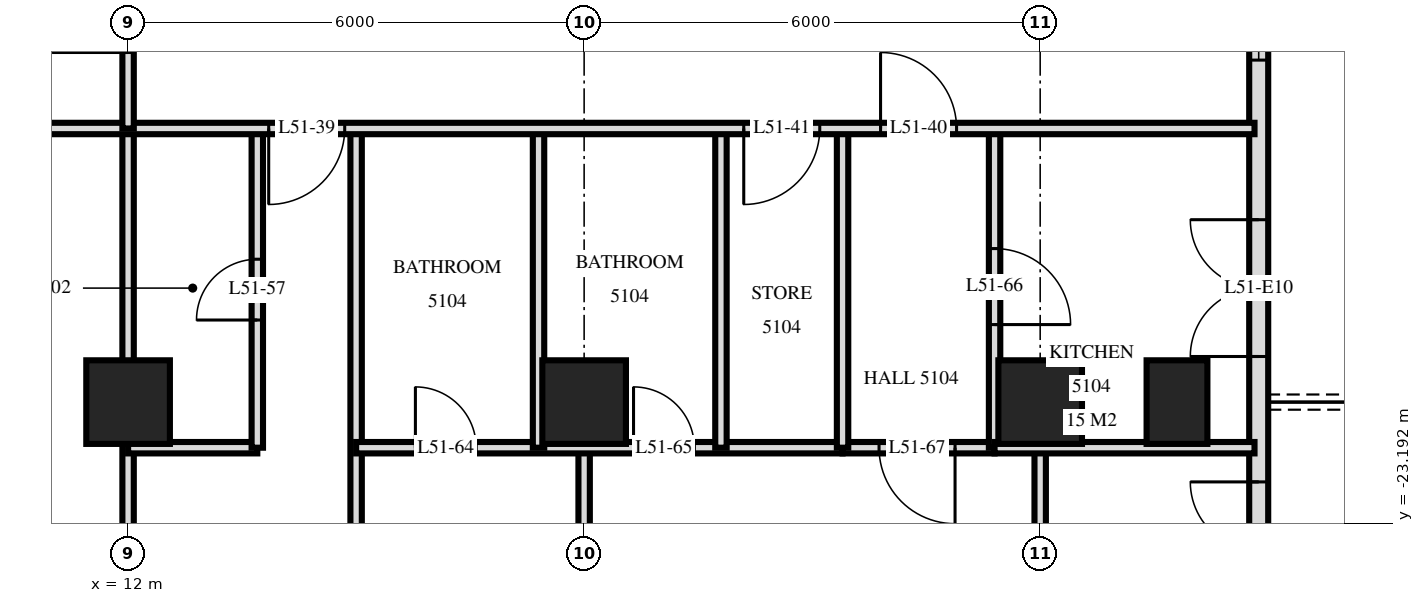
"""IFC4 building model, lengths in metres.
Left out: names, types, materials, properties, quantities, classifications, styles, units other than length and angle.
Written with IfcOpenShell. Run it as: python <this file> out.ifc"""

import sys

from ifc_helpers import new_model, si_unit, direction, frame, frame_2d, origin, origin_2d, place, context, subcontext, project, spatial, rectangle, extrude, element, fill, save


model = new_model("IFC4")
c1 = context("Model", 3, precision=1e-05, world=origin(), true_north=direction((0.0, 1.0)))
c2 = subcontext(c1, "Body", "Model", "MODEL_VIEW")
j1 = project(units=[si_unit("LENGTHUNIT", "METRE"), si_unit("PLANEANGLEUNIT", "RADIAN")], contexts=[c1])
p1 = place(None, origin())
s1 = spatial("IfcSite", under=j1, at=p1, CompositionType="ELEMENT")
p2 = place(p1, origin())
s2 = spatial("IfcBuilding", under=s1, at=p2, CompositionType="ELEMENT")
p3 = place(p2, frame((0.0, 0.0, 197.6)))
s3 = spatial("IfcBuildingStorey", under=s2, at=p3, CompositionType="ELEMENT", Elevation=197.6)
for number, where, z_axis, x_axis in (
    (1, (12.0, -21.6, 0.0), (0.0, 0.0, 1.0), (1.0, 0.0, 0.0)),
    (2, (18.0, -21.6, 0.0), (0.0, 0.0, 1.0), (1.0, 0.0, 0.0)),
    (3, (24.0, -21.6, 0.0), (0.0, 0.0, 1.0), (1.0, 0.0, 0.0)),
):
    element("IfcColumn", number, at=place(p3, frame(where, z_axis=z_axis, x_axis=x_axis)), inside=s3, PredefinedType="COLUMN", context=c2, shape_type="SweptSolid", body=[
        extrude(rectangle(XDim=1.1, YDim=1.1, at=origin_2d()), origin(), (0.0, 0.0, 1.0), 3.5),
    ])
p4 = place(p3, frame((25.8, -21.6, 0.0), z_axis=(0.0, 0.0, 1.0), x_axis=(0.0, 1.0, 0.0)))
e4 = element("IfcColumn", 4, at=p4, inside=s3, PredefinedType="COLUMN", context=c2, shape_type="SweptSolid", body=[
    extrude(rectangle(XDim=1.1, YDim=0.8, at=origin_2d()), origin(), (0.0, 0.0, 1.0), 3.5),
])
p5 = place(p3, frame((26.875, -24.875, 0.0), z_axis=(0.0, 0.0, 1.0), x_axis=(0.0, 1.0, 0.0)))
e5 = element("IfcWall", 5, at=p5, inside=s3, PredefinedType="SOLIDWALL", context=c2, shape_type="SweptSolid", body=[
    extrude(rectangle(XDim=21.551, YDim=0.25, at=frame_2d((10.775, 0.0))), origin(), (0.0, 0.0, 1.0), 3.22),
])
p6 = place(p5, frame((0.425, 0.0, 0.0)))
e6 = element("IfcOpeningElement", 6, at=p6, cuts=e5, PredefinedType="OPENING", context=c2, shape_type="SweptSolid", body=[
    extrude(rectangle(XDim=1.8, YDim=2.4, at=frame_2d((0.9, 1.2))), frame((0.0, 0.135, 0.0), z_axis=(0.0, -1.0, 0.0), x_axis=(1.0, 0.0, 0.0)), (0.0, 0.0, 1.0), 0.27),
])
p7 = place(p5, frame((3.875, 0.0, 0.0)))
e7 = element("IfcOpeningElement", 7, at=p7, cuts=e5, PredefinedType="OPENING", context=c2, shape_type="SweptSolid", body=[
    extrude(rectangle(XDim=1.8, YDim=2.4, at=frame_2d((0.9, 1.2))), frame((0.0, 0.135, 0.0), z_axis=(0.0, -1.0, 0.0), x_axis=(1.0, 0.0, 0.0)), (0.0, 0.0, 1.0), 0.27),
])
p8 = place(p5, frame((7.775, 0.0, 0.9)))
e8 = element("IfcOpeningElement", 8, at=p8, cuts=e5, PredefinedType="OPENING", context=c2, shape_type="SweptSolid", body=[
    extrude(rectangle(XDim=1.2, YDim=1.5, at=frame_2d((0.6, 0.75))), frame((0.0, 0.135, 0.0), z_axis=(0.0, -1.0, 0.0), x_axis=(1.0, 0.0, 0.0)), (0.0, 0.0, 1.0), 0.27),
])
p9 = place(p5, frame((11.975, 0.0, 0.0)))
e9 = element("IfcOpeningElement", 9, at=p9, cuts=e5, PredefinedType="OPENING", context=c2, shape_type="SweptSolid", body=[
    extrude(rectangle(XDim=1.8, YDim=2.4, at=frame_2d((0.9, 1.2))), frame((0.0, 0.135, 0.0), z_axis=(0.0, -1.0, 0.0), x_axis=(1.0, 0.0, 0.0)), (0.0, 0.0, 1.0), 0.27),
])
p10 = place(p3, frame((24.0, -28.918, 0.0), z_axis=(0.0, 0.0, 1.0), x_axis=(0.0, 1.0, 0.0)))
e10 = element("IfcWall", 10, at=p10, inside=s3, PredefinedType="PARTITIONING", context=c2, shape_type="SweptSolid", body=[
    extrude(rectangle(XDim=6.718, YDim=0.15, at=frame_2d((3.359, 0.0))), origin(), (0.0, 0.0, 1.0), 3.22),
])
p11 = place(p10, frame((2.948, 0.0, 0.0)))
e11 = element("IfcOpeningElement", 11, at=p11, cuts=e10, PredefinedType="OPENING", context=c2, shape_type="SweptSolid", body=[
    extrude(rectangle(XDim=0.9, YDim=2.1, at=frame_2d((0.45, 1.05))), frame((0.0, 0.085, 0.0), z_axis=(0.0, -1.0, 0.0), x_axis=(1.0, 0.0, 0.0)), (0.0, 0.0, 1.0), 0.17),
])
p12 = place(p3, frame((23.4, -22.2, 0.0), z_axis=(0.0, 0.0, 1.0), x_axis=(0.0, 1.0, 0.0)))
e12 = element("IfcWall", 12, at=p12, inside=s3, PredefinedType="PARTITIONING", context=c2, shape_type="SweptSolid", body=[
    extrude(rectangle(XDim=4.2, YDim=0.15, at=frame_2d((2.1, 0.0))), origin(), (0.0, 0.0, 1.0), 3.22),
])
p13 = place(p12, frame((1.62, 0.0, 0.0)))
e13 = element("IfcOpeningElement", 13, at=p13, cuts=e12, PredefinedType="OPENING", context=c2, shape_type="SweptSolid", body=[
    extrude(rectangle(XDim=1.0, YDim=2.1, at=frame_2d((0.5, 1.05))), frame((0.0, 0.085, 0.0), z_axis=(0.0, -1.0, 0.0), x_axis=(1.0, 0.0, 0.0)), (0.0, 0.0, 1.0), 0.17),
])
for number, where, z_axis, x_axis in (
    (14, (21.4, -22.2, 0.0), (0.0, 0.0, 1.0), (0.0, 1.0, 0.0)),
    (15, (19.8, -22.2, 0.0), (0.0, 0.0, 1.0), (0.0, 1.0, 0.0)),
):
    element("IfcWall", number, at=place(p3, frame(where, z_axis=z_axis, x_axis=x_axis)), inside=s3, PredefinedType="PARTITIONING", context=c2, shape_type="SweptSolid", body=[
        extrude(rectangle(XDim=4.2, YDim=0.15, at=frame_2d((2.1, 0.0))), origin(), (0.0, 0.0, 1.0), 3.22),
    ])
p14 = place(p3, frame((18.0, -29.22, 0.0), z_axis=(0.0, 0.0, 1.0), x_axis=(0.0, 1.0, 0.0)))
e16 = element("IfcWall", 16, at=p14, inside=s3, PredefinedType="PARTITIONING", context=c2, shape_type="SweptSolid", body=[
    extrude(rectangle(XDim=7.02, YDim=0.15, at=frame_2d((3.51, 0.0))), origin(), (0.0, 0.0, 1.0), 3.22),
])
p15 = place(p14, frame((2.99, 0.0, 0.0)))
e17 = element("IfcOpeningElement", 17, at=p15, cuts=e16, PredefinedType="OPENING", context=c2, shape_type="SweptSolid", body=[
    extrude(rectangle(XDim=0.9, YDim=2.1, at=frame_2d((0.45, 1.05))), frame((0.0, 0.085, 0.0), z_axis=(0.0, -1.0, 0.0), x_axis=(1.0, 0.0, 0.0)), (0.0, 0.0, 1.0), 0.17),
])
p16 = place(p3, frame((17.4, -22.2, 0.0), z_axis=(0.0, 0.0, 1.0), x_axis=(0.0, 1.0, 0.0)))
e18 = element("IfcWall", 18, at=p16, inside=s3, PredefinedType="PARTITIONING", context=c2, shape_type="SweptSolid", body=[
    extrude(rectangle(XDim=4.2, YDim=0.15, at=frame_2d((2.1, 0.0))), origin(), (0.0, 0.0, 1.0), 3.22),
])
p17 = place(p3, frame((15.0, -29.22, 0.0), z_axis=(0.0, 0.0, 1.0), x_axis=(0.0, 1.0, 0.0)))
e19 = element("IfcWall", 19, at=p17, inside=s3, PredefinedType="PARTITIONING", context=c2, shape_type="SweptSolid", body=[
    extrude(rectangle(XDim=11.22, YDim=0.15, at=frame_2d((5.61, 0.0))), origin(), (0.0, 0.0, 1.0), 3.22),
])
p18 = place(p3, frame((13.7, -22.2, 0.0), z_axis=(0.0, 0.0, 1.0), x_axis=(0.0, 1.0, 0.0)))
e20 = element("IfcWall", 20, at=p18, inside=s3, PredefinedType="PARTITIONING", context=c2, shape_type="SweptSolid", body=[
    extrude(rectangle(XDim=4.2, YDim=0.15, at=frame_2d((2.1, 0.0))), origin(), (0.0, 0.0, 1.0), 3.22),
])
p19 = place(p18, frame((1.68, 0.0, 0.0)))
e21 = element("IfcOpeningElement", 21, at=p19, cuts=e20, PredefinedType="OPENING", context=c2, shape_type="SweptSolid", body=[
    extrude(rectangle(XDim=0.8, YDim=2.1, at=frame_2d((0.4, 1.05))), frame((0.0, 0.085, 0.0), z_axis=(0.0, -1.0, 0.0), x_axis=(1.0, 0.0, 0.0)), (0.0, 0.0, 1.0), 0.17),
])
p20 = place(p3, frame((12.0, -18.0, 0.0), z_axis=(0.0, 0.0, 1.0), x_axis=(0.0, 1.0, 0.0)))
e22 = element("IfcWall", 22, at=p20, inside=s3, PredefinedType="PARTITIONING", context=c2, shape_type="SweptSolid", body=[
    extrude(rectangle(XDim=2.95, YDim=0.15, at=frame_2d((1.475, 0.0))), origin(), (0.0, 0.0, 1.0), 3.22),
])
p21 = place(p20, frame((1.0, 0.0, 0.0)))
e23 = element("IfcOpeningElement", 23, at=p21, cuts=e22, PredefinedType="OPENING", context=c2, shape_type="SweptSolid", body=[
    extrude(rectangle(XDim=1.0, YDim=2.1, at=frame_2d((0.5, 1.05))), frame((0.0, 0.085, 0.0), z_axis=(0.0, -1.0, 0.0), x_axis=(1.0, 0.0, 0.0)), (0.0, 0.0, 1.0), 0.17),
])
p22 = place(p3, frame((12.0, -29.22, 0.0), z_axis=(0.0, 0.0, 1.0), x_axis=(0.0, 1.0, 0.0)))
e24 = element("IfcWall", 24, at=p22, inside=s3, PredefinedType="PARTITIONING", context=c2, shape_type="SweptSolid", body=[
    extrude(rectangle(XDim=11.22, YDim=0.15, at=frame_2d((5.61, 0.0))), origin(), (0.0, 0.0, 1.0), 3.22),
])
p23 = place(p3, frame((21.4, -22.2, 0.0), z_axis=(0.0, 0.0, 1.0), x_axis=(1.0, 0.0, 0.0)))
e25 = element("IfcWall", 25, at=p23, inside=s3, PredefinedType="PARTITIONING", context=c2, shape_type="SweptSolid", body=[
    extrude(rectangle(XDim=2.0, YDim=0.15, at=frame_2d((1.0, 0.0))), origin(), (0.0, 0.0, 1.0), 3.22),
])
p24 = place(p23, frame((0.48, 0.0, 0.0)))
e26 = element("IfcOpeningElement", 26, at=p24, cuts=e25, PredefinedType="OPENING", context=c2, shape_type="SweptSolid", body=[
    extrude(rectangle(XDim=1.0, YDim=2.1, at=frame_2d((0.5, 1.05))), frame((0.0, 0.085, 0.0), z_axis=(0.0, -1.0, 0.0), x_axis=(1.0, 0.0, 0.0)), (0.0, 0.0, 1.0), 0.17),
])
p25 = place(p3, frame((12.0, -22.2, 0.0), z_axis=(0.0, 0.0, 1.0), x_axis=(1.0, 0.0, 0.0)))
e27 = element("IfcWall", 27, at=p25, inside=s3, PredefinedType="PARTITIONING", context=c2, shape_type="SweptSolid", body=[
    extrude(rectangle(XDim=1.7, YDim=0.15, at=frame_2d((0.85, 0.0))), origin(), (0.0, 0.0, 1.0), 3.22),
])
p26 = place(p3, frame((15.0, -22.2, 0.0), z_axis=(0.0, 0.0, 1.0), x_axis=(1.0, 0.0, 0.0)))
e28 = element("IfcWall", 28, at=p26, inside=s3, PredefinedType="PARTITIONING", context=c2, shape_type="SweptSolid", body=[
    extrude(rectangle(XDim=6.4, YDim=0.15, at=frame_2d((3.2, 0.0))), origin(), (0.0, 0.0, 1.0), 3.22),
])
p27 = place(p26, frame((0.78, 0.0, 0.0)))
e29 = element("IfcOpeningElement", 29, at=p27, cuts=e28, PredefinedType="OPENING", context=c2, shape_type="SweptSolid", body=[
    extrude(rectangle(XDim=0.8, YDim=2.1, at=frame_2d((0.4, 1.05))), frame((0.0, 0.085, 0.0), z_axis=(0.0, -1.0, 0.0), x_axis=(1.0, 0.0, 0.0)), (0.0, 0.0, 1.0), 0.17),
])
p28 = place(p26, frame((3.65, 0.0, 0.0)))
e30 = element("IfcOpeningElement", 30, at=p28, cuts=e28, PredefinedType="OPENING", context=c2, shape_type="SweptSolid", body=[
    extrude(rectangle(XDim=0.8, YDim=2.1, at=frame_2d((0.4, 1.05))), frame((0.0, 0.085, 0.0), z_axis=(0.0, -1.0, 0.0), x_axis=(1.0, 0.0, 0.0)), (0.0, 0.0, 1.0), 0.17),
])
p29 = place(p3, frame((23.4, -22.2, 0.0), z_axis=(0.0, 0.0, 1.0), x_axis=(1.0, 0.0, 0.0)))
e31 = element("IfcWall", 31, at=p29, inside=s3, PredefinedType="PARTITIONING", context=c2, shape_type="SweptSolid", body=[
    extrude(rectangle(XDim=3.42, YDim=0.15, at=frame_2d((1.71, 0.0))), origin(), (0.0, 0.0, 1.0), 3.22),
])
p30 = place(p3, frame((-26.82, -18.0, 0.0), z_axis=(0.0, 0.0, 1.0), x_axis=(1.0, 0.0, 0.0)))
e32 = element("IfcWall", 32, at=p30, inside=s3, PredefinedType="PARTITIONING", context=c2, shape_type="SweptSolid", body=[
    extrude(rectangle(XDim=53.64, YDim=0.15, at=frame_2d((26.82, 0.0))), origin(), (0.0, 0.0, 1.0), 3.22),
])
p31 = place(p30, frame((11.97, 0.0, 0.0)))
e33 = element("IfcOpeningElement", 33, at=p31, cuts=e32, PredefinedType="OPENING", context=c2, shape_type="SweptSolid", body=[
    extrude(rectangle(XDim=1.0, YDim=2.1, at=frame_2d((0.5, 1.05))), frame((0.0, 0.085, 0.0), z_axis=(0.0, -1.0, 0.0), x_axis=(1.0, 0.0, 0.0)), (0.0, 0.0, 1.0), 0.17),
])
p32 = place(p30, frame((3.92, 0.0, 0.0)))
e34 = element("IfcOpeningElement", 34, at=p32, cuts=e32, PredefinedType="OPENING", context=c2, shape_type="SweptSolid", body=[
    extrude(rectangle(XDim=1.0, YDim=2.1, at=frame_2d((0.5, 1.05))), frame((0.0, 0.085, 0.0), z_axis=(0.0, -1.0, 0.0), x_axis=(1.0, 0.0, 0.0)), (0.0, 0.0, 1.0), 0.17),
])
p33 = place(p30, frame((5.72, 0.0, 0.0)))
e35 = element("IfcOpeningElement", 35, at=p33, cuts=e32, PredefinedType="OPENING", context=c2, shape_type="SweptSolid", body=[
    extrude(rectangle(XDim=1.0, YDim=2.1, at=frame_2d((0.5, 1.05))), frame((0.0, 0.085, 0.0), z_axis=(0.0, -1.0, 0.0), x_axis=(1.0, 0.0, 0.0)), (0.0, 0.0, 1.0), 0.17),
])
p34 = place(p30, frame((40.67, 0.0, 0.0)))
e36 = element("IfcOpeningElement", 36, at=p34, cuts=e32, PredefinedType="OPENING", context=c2, shape_type="SweptSolid", body=[
    extrude(rectangle(XDim=1.0, YDim=2.1, at=frame_2d((0.5, 1.05))), frame((0.0, 0.085, 0.0), z_axis=(0.0, -1.0, 0.0), x_axis=(1.0, 0.0, 0.0)), (0.0, 0.0, 1.0), 0.17),
])
p35 = place(p30, frame((48.72, 0.0, 0.0)))
e37 = element("IfcOpeningElement", 37, at=p35, cuts=e32, PredefinedType="OPENING", context=c2, shape_type="SweptSolid", body=[
    extrude(rectangle(XDim=1.0, YDim=2.1, at=frame_2d((0.5, 1.05))), frame((0.0, 0.085, 0.0), z_axis=(0.0, -1.0, 0.0), x_axis=(1.0, 0.0, 0.0)), (0.0, 0.0, 1.0), 0.17),
])
p36 = place(p30, frame((46.92, 0.0, 0.0)))
e38 = element("IfcOpeningElement", 38, at=p36, cuts=e32, PredefinedType="OPENING", context=c2, shape_type="SweptSolid", body=[
    extrude(rectangle(XDim=1.0, YDim=2.1, at=frame_2d((0.5, 1.05))), frame((0.0, 0.085, 0.0), z_axis=(0.0, -1.0, 0.0), x_axis=(1.0, 0.0, 0.0)), (0.0, 0.0, 1.0), 0.17),
])
p37 = place(p30, frame((17.32, 0.0, 0.0)))
e39 = element("IfcOpeningElement", 39, at=p37, cuts=e32, PredefinedType="OPENING", context=c2, shape_type="SweptSolid", body=[
    extrude(rectangle(XDim=1.0, YDim=2.1, at=frame_2d((0.5, 1.05))), frame((0.0, 0.085, 0.0), z_axis=(0.0, -1.0, 0.0), x_axis=(1.0, 0.0, 0.0)), (0.0, 0.0, 1.0), 0.17),
])
p38 = place(p30, frame((23.32, 0.0, 0.0)))
e40 = element("IfcOpeningElement", 40, at=p38, cuts=e32, PredefinedType="OPENING", context=c2, shape_type="SweptSolid", body=[
    extrude(rectangle(XDim=1.0, YDim=2.1, at=frame_2d((0.5, 1.05))), frame((0.0, 0.085, 0.0), z_axis=(0.0, -1.0, 0.0), x_axis=(1.0, 0.0, 0.0)), (0.0, 0.0, 1.0), 0.17),
])
p39 = place(p30, frame((29.32, 0.0, 0.0)))
e41 = element("IfcOpeningElement", 41, at=p39, cuts=e32, PredefinedType="OPENING", context=c2, shape_type="SweptSolid", body=[
    extrude(rectangle(XDim=1.0, YDim=2.1, at=frame_2d((0.5, 1.05))), frame((0.0, 0.085, 0.0), z_axis=(0.0, -1.0, 0.0), x_axis=(1.0, 0.0, 0.0)), (0.0, 0.0, 1.0), 0.17),
])
p40 = place(p30, frame((35.32, 0.0, 0.0)))
e42 = element("IfcOpeningElement", 42, at=p40, cuts=e32, PredefinedType="OPENING", context=c2, shape_type="SweptSolid", body=[
    extrude(rectangle(XDim=1.0, YDim=2.1, at=frame_2d((0.5, 1.05))), frame((0.0, 0.085, 0.0), z_axis=(0.0, -1.0, 0.0), x_axis=(1.0, 0.0, 0.0)), (0.0, 0.0, 1.0), 0.17),
])
p41 = place(p6, origin())
e43 = element("IfcDoor", 43, at=p41, inside=s3, OperationType="DOUBLE_DOOR_SINGLE_SWING", PredefinedType="DOOR", context=c2, shape_type="SweptSolid", body=[
    extrude(rectangle(XDim=1.8, YDim=2.4, at=frame_2d((0.9, 1.2))), frame((0.0, 0.025, 0.0), z_axis=(0.0, -1.0, 0.0), x_axis=(1.0, 0.0, 0.0)), (0.0, 0.0, 1.0), 0.05),
])
fill(e6, e43)
p42 = place(p7, origin())
e44 = element("IfcDoor", 44, at=p42, inside=s3, OperationType="DOUBLE_DOOR_SINGLE_SWING", PredefinedType="DOOR", context=c2, shape_type="SweptSolid", body=[
    extrude(rectangle(XDim=1.8, YDim=2.4, at=frame_2d((0.9, 1.2))), frame((0.0, 0.025, 0.0), z_axis=(0.0, -1.0, 0.0), x_axis=(1.0, 0.0, 0.0)), (0.0, 0.0, 1.0), 0.05),
])
fill(e7, e44)
p43 = place(p8, origin())
e45 = element("IfcWindow", 45, at=p43, inside=s3, PartitioningType="SINGLE_PANEL", PredefinedType="WINDOW", context=c2, shape_type="SweptSolid", body=[
    extrude(rectangle(XDim=1.2, YDim=1.5, at=frame_2d((0.6, 0.75))), frame((0.0, 0.03, 0.0), z_axis=(0.0, -1.0, 0.0), x_axis=(1.0, 0.0, 0.0)), (0.0, 0.0, 1.0), 0.06),
])
fill(e8, e45)
p44 = place(p34, frame((0.5, 0.0, 0.0), z_axis=(0.0, 0.0, 1.0), x_axis=(-1.0, 0.0, 0.0)))
e46 = element("IfcDoor", 46, at=p44, inside=s3, OperationType="SINGLE_SWING_LEFT", PredefinedType="DOOR", context=c2, shape_type="SweptSolid", body=[
    extrude(rectangle(XDim=1.0, YDim=2.1, at=frame_2d((0.0, 1.05))), frame((0.0, -0.025, 0.0), z_axis=(0.0, 1.0, 0.0), x_axis=(-1.0, 0.0, 0.0)), (0.0, 0.0, 1.0), 0.05),
])
fill(e36, e46)
p45 = place(p35, origin())
e47 = element("IfcDoor", 47, at=p45, inside=s3, OperationType="SINGLE_SWING_RIGHT", PredefinedType="DOOR", context=c2, shape_type="SweptSolid", body=[
    extrude(rectangle(XDim=1.0, YDim=2.1, at=frame_2d((0.5, 1.05))), frame((0.0, 0.025, 0.0), z_axis=(0.0, -1.0, 0.0), x_axis=(1.0, 0.0, 0.0)), (0.0, 0.0, 1.0), 0.05),
])
fill(e37, e47)
p46 = place(p36, frame((0.5, 0.0, 0.0), z_axis=(0.0, 0.0, 1.0), x_axis=(-1.0, 0.0, 0.0)))
e48 = element("IfcDoor", 48, at=p46, inside=s3, OperationType="SINGLE_SWING_LEFT", PredefinedType="DOOR", context=c2, shape_type="SweptSolid", body=[
    extrude(rectangle(XDim=1.0, YDim=2.1, at=frame_2d((0.0, 1.05))), frame((0.0, -0.025, 0.0), z_axis=(0.0, 1.0, 0.0), x_axis=(-1.0, 0.0, 0.0)), (0.0, 0.0, 1.0), 0.05),
])
fill(e38, e48)
p47 = place(p19, origin())
e49 = element("IfcDoor", 49, at=p47, inside=s3, OperationType="SINGLE_SWING_RIGHT", PredefinedType="DOOR", context=c2, shape_type="SweptSolid", body=[
    extrude(rectangle(XDim=0.8, YDim=2.1, at=frame_2d((0.4, 1.05))), frame((0.0, 0.025, 0.0), z_axis=(0.0, -1.0, 0.0), x_axis=(1.0, 0.0, 0.0)), (0.0, 0.0, 1.0), 0.05),
])
fill(e21, e49)
p48 = place(p27, origin())
e50 = element("IfcDoor", 50, at=p48, inside=s3, OperationType="SINGLE_SWING_RIGHT", PredefinedType="DOOR", context=c2, shape_type="SweptSolid", body=[
    extrude(rectangle(XDim=0.8, YDim=2.1, at=frame_2d((0.4, 1.05))), frame((0.0, 0.025, 0.0), z_axis=(0.0, -1.0, 0.0), x_axis=(1.0, 0.0, 0.0)), (0.0, 0.0, 1.0), 0.05),
])
fill(e29, e50)
p49 = place(p28, origin())
e51 = element("IfcDoor", 51, at=p49, inside=s3, OperationType="SINGLE_SWING_RIGHT", PredefinedType="DOOR", context=c2, shape_type="SweptSolid", body=[
    extrude(rectangle(XDim=0.8, YDim=2.1, at=frame_2d((0.4, 1.05))), frame((0.0, 0.025, 0.0), z_axis=(0.0, -1.0, 0.0), x_axis=(1.0, 0.0, 0.0)), (0.0, 0.0, 1.0), 0.05),
])
fill(e30, e51)
p50 = place(p13, frame((0.5, 0.0, 0.0), z_axis=(0.0, 0.0, 1.0), x_axis=(-1.0, 0.0, 0.0)))
e52 = element("IfcDoor", 52, at=p50, inside=s3, OperationType="SINGLE_SWING_LEFT", PredefinedType="DOOR", context=c2, shape_type="SweptSolid", body=[
    extrude(rectangle(XDim=1.0, YDim=2.1, at=frame_2d((0.0, 1.05))), frame((0.0, -0.025, 0.0), z_axis=(0.0, 1.0, 0.0), x_axis=(-1.0, 0.0, 0.0)), (0.0, 0.0, 1.0), 0.05),
])
fill(e13, e52)
p51 = place(p24, frame((0.5, 0.0, 0.0), z_axis=(0.0, 0.0, 1.0), x_axis=(-1.0, 0.0, 0.0)))
e53 = element("IfcDoor", 53, at=p51, inside=s3, OperationType="SINGLE_SWING_RIGHT", PredefinedType="DOOR", context=c2, shape_type="SweptSolid", body=[
    extrude(rectangle(XDim=1.0, YDim=2.1, at=frame_2d((0.0, 1.05))), frame((0.0, -0.025, 0.0), z_axis=(0.0, 1.0, 0.0), x_axis=(-1.0, 0.0, 0.0)), (0.0, 0.0, 1.0), 0.05),
])
fill(e26, e53)
save(model, sys.argv[1])
